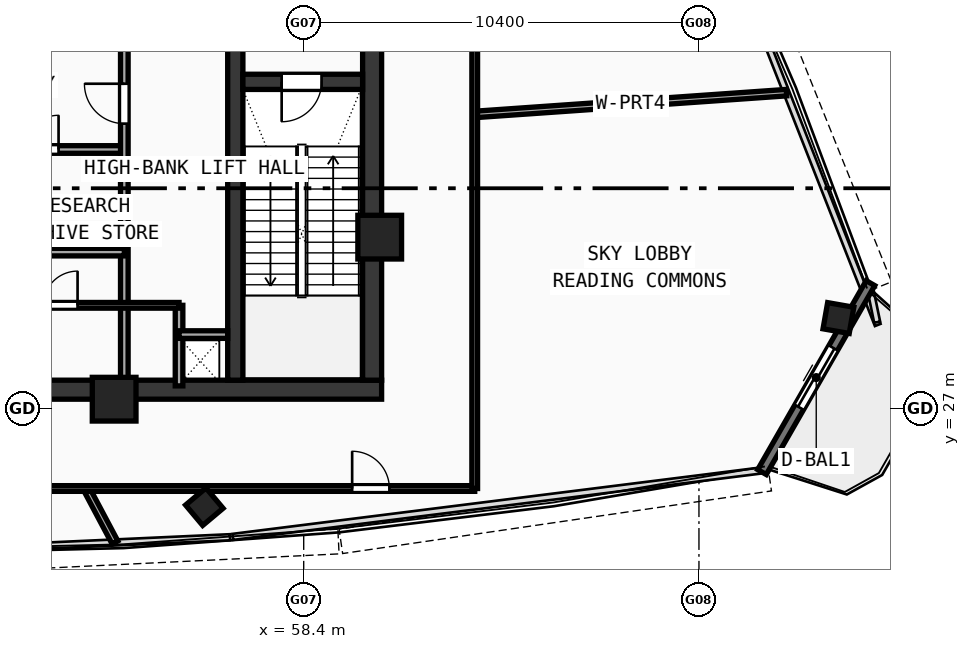
"""IFC4 building model, lengths in metres.
Left out: names, types, materials, properties, quantities, classifications, styles, units other than length and angle.
Written with IfcOpenShell. Run it as: python <this file> out.ifc"""

import sys

from ifc_helpers import new_model, si_unit, direction, frame, frame_2d, origin, origin_with_axes, origin_2d, place, context, subcontext, project, spatial, rectangle, hollow_rectangle, extrude, source, transform, mapped, element, fill, save


model = new_model("IFC4")
c1 = context("Model", 3, precision=1e-05, world=origin(), true_north=direction((0.0, 1.0)))
c2 = subcontext(c1, "Body", "Model", "MODEL_VIEW")
j1 = project(units=[si_unit("LENGTHUNIT", "METRE"), si_unit("PLANEANGLEUNIT", "RADIAN")], contexts=[c1])
p1 = place(None, origin())
s1 = spatial("IfcSite", under=j1, at=p1, CompositionType="ELEMENT")
p2 = place(p1, origin())
s2 = spatial("IfcBuilding", under=s1, at=p2, CompositionType="ELEMENT")
p3 = place(p2, frame((0.0, 0.0, 366.76)))
s3 = spatial("IfcBuildingStorey", under=s2, at=p3, CompositionType="ELEMENT", Elevation=366.76)
p4 = place(p3, frame((35.55, 27.5, 0.0), z_axis=(0.0, 0.0, 1.0), x_axis=(1.0, 0.0, 0.0)))
e1 = element("IfcWall", 1, at=p4, inside=s3, PredefinedType="SHEAR", context=c2, shape_type="SweptSolid", body=[
    extrude(rectangle(XDim=24.9, YDim=0.5, at=frame_2d((12.45, 0.0))), origin(), (0.0, 0.0, 1.0), 4.72),
])
p5 = place(p3, frame((60.2, 27.75, 0.0), z_axis=(0.0, 0.0, 1.0), x_axis=(0.0, 1.0, 0.0)))
e2 = element("IfcWall", 2, at=p5, inside=s3, PredefinedType="SHEAR", context=c2, shape_type="SweptSolid", body=[
    extrude(rectangle(XDim=12.2, YDim=0.5, at=frame_2d((6.1, 0.0))), origin(), (0.0, 0.0, 1.0), 4.72),
])
p6 = place(p3, frame((56.6, 27.75, 0.0), z_axis=(0.0, 0.0, 1.0), x_axis=(0.0, 1.0, 0.0)))
e3 = element("IfcWall", 3, at=p6, inside=s3, PredefinedType="SHEAR", context=c2, shape_type="SweptSolid", body=[
    extrude(rectangle(XDim=12.2, YDim=0.4, at=frame_2d((6.1, 0.0))), origin(), (0.0, 0.0, 1.0), 4.72),
])
p7 = place(p6, frame((10.0, 0.0, 0.0)))
e4 = element("IfcOpeningElement", 4, at=p7, cuts=e3, PredefinedType="OPENING", context=c2, shape_type="SweptSolid", body=[
    extrude(rectangle(XDim=1.1, YDim=2.1, at=frame_2d((0.55, 1.05))), frame((0.0, 0.21, 0.0), z_axis=(0.0, -1.0, 0.0), x_axis=(1.0, 0.0, 0.0)), (0.0, 0.0, 1.0), 0.42),
])
p8 = place(p3, frame((56.8, 35.6, 0.0), z_axis=(0.0, 0.0, 1.0), x_axis=(1.0, 0.0, 0.0)))
e5 = element("IfcWall", 5, at=p8, inside=s3, PredefinedType="SHEAR", context=c2, shape_type="SweptSolid", body=[
    extrude(rectangle(XDim=3.15, YDim=0.4, at=frame_2d((1.575, 0.0))), origin(), (0.0, 0.0, 1.0), 4.72),
])
p9 = place(p8, frame((1.02, 0.0, 0.0)))
e6 = element("IfcOpeningElement", 6, at=p9, cuts=e5, PredefinedType="OPENING", context=c2, shape_type="SweptSolid", body=[
    extrude(rectangle(XDim=1.05, YDim=2.1, at=frame_2d((0.525, 1.05))), frame((0.0, 0.21, 0.0), z_axis=(0.0, -1.0, 0.0), x_axis=(1.0, 0.0, 0.0)), (0.0, 0.0, 1.0), 0.42),
])
m1 = source(origin(), c2, "Body", "SweptSolid", [
    extrude(hollow_rectangle(XDim=1.15, YDim=1.15, WallThickness=0.048, at=origin_2d()), origin(), (0.0, 0.0, 1.0), 5.0),
])
for number, where, z_axis, x_axis in (
    (7, (53.412, 27.25, -0.28), (0.0, 0.0, 1.0), (1.0, 0.0, 0.0)),
    (8, (60.4, 31.513, -0.28), (0.0, 0.0, 1.0), (1.0, 0.0, 0.0)),
):
    element("IfcColumn", number, at=place(p3, frame(where, z_axis=z_axis, x_axis=x_axis)), inside=s3, PredefinedType="COLUMN", context=c2, shape_type="MappedRepresentation", body=[
        mapped(m1, transform((0.0, 0.0, 0.0), scale=1.0)),
    ])
m2 = source(origin(), c2, "Body", "SweptSolid", [
    extrude(hollow_rectangle(XDim=0.7, YDim=0.7, WallThickness=0.026, at=origin_2d()), origin(), (0.0, 0.0, 1.0), 5.0),
])
for number, where, z_axis, x_axis in (
    (9, (55.785, 24.422, -0.28), (0.0, 0.0, 1.0), (0.766, 0.643, 0.0)),
    (10, (72.47, 29.385, -0.28), (0.0, 0.0, 1.0), (0.174, 0.985, 0.0)),
):
    element("IfcColumn", number, at=place(p3, frame(where, z_axis=z_axis, x_axis=x_axis)), inside=s3, PredefinedType="COLUMN", context=c2, shape_type="MappedRepresentation", body=[
        mapped(m2, transform((0.0, 0.0, 0.0), scale=1.0)),
    ])
p10 = place(p3, frame((70.459, 25.333, 0.0), z_axis=(0.0, 0.0, 1.0), x_axis=(0.497922092791, 0.867221764897, 0.0)))
e11 = element("IfcWall", 11, at=p10, inside=s3, PredefinedType="STANDARD", context=c2, shape_type="SweptSolid", body=[
    extrude(rectangle(XDim=5.732, YDim=0.26, at=frame_2d((2.866, 0.0))), origin(), (0.0, 0.0, 1.0), 4.72),
])
p11 = place(p10, frame((1.966, 0.0, 0.0)))
e12 = element("IfcOpeningElement", 12, at=p11, cuts=e11, PredefinedType="OPENING", context=c2, shape_type="SweptSolid", body=[
    extrude(rectangle(XDim=1.8, YDim=2.15, at=frame_2d((0.9, 1.075))), frame((0.0, 0.14, 0.0), z_axis=(0.0, -1.0, 0.0), x_axis=(1.0, 0.0, 0.0)), (0.0, 0.0, 1.0), 0.28),
])
p12 = place(p3, frame((43.85, 33.82, 0.0), z_axis=(0.0, 0.0, 1.0), x_axis=(1.0, 0.0, 0.0)))
e13 = element("IfcWall", 13, at=p12, inside=s3, PredefinedType="SOLIDWALL", context=c2, shape_type="SweptSolid", body=[
    extrude(rectangle(XDim=9.83, YDim=0.2, at=frame_2d((4.915, 0.0))), origin(), (0.0, 0.0, 1.0), 4.72),
])
p13 = place(p12, frame((1.2, 0.0, 0.0)))
e14 = element("IfcOpeningElement", 14, at=p13, cuts=e13, PredefinedType="OPENING", context=c2, shape_type="SweptSolid", body=[
    extrude(rectangle(XDim=0.9, YDim=2.1, at=frame_2d((0.45, 1.05))), frame((0.0, 0.11, 0.0), z_axis=(0.0, -1.0, 0.0), x_axis=(1.0, 0.0, 0.0)), (0.0, 0.0, 1.0), 0.22),
])
p14 = place(p12, frame((7.2, 0.0, 0.0)))
e15 = element("IfcOpeningElement", 15, at=p14, cuts=e13, PredefinedType="OPENING", context=c2, shape_type="SweptSolid", body=[
    extrude(rectangle(XDim=0.9, YDim=2.1, at=frame_2d((0.45, 1.05))), frame((0.0, 0.11, 0.0), z_axis=(0.0, -1.0, 0.0), x_axis=(1.0, 0.0, 0.0)), (0.0, 0.0, 1.0), 0.22),
])
p15 = place(p3, frame((53.68, 27.6, 0.0), z_axis=(0.0, 0.0, 1.0), x_axis=(0.0, 1.0, 0.0)))
e16 = element("IfcWall", 16, at=p15, inside=s3, PredefinedType="SOLIDWALL", context=c2, shape_type="SweptSolid", body=[
    extrude(rectangle(XDim=9.05, YDim=0.2, at=frame_2d((4.525, 0.0))), origin(), (0.0, 0.0, 1.0), 4.72),
])
p16 = place(p15, frame((6.9, 0.0, 0.0)))
e17 = element("IfcOpeningElement", 17, at=p16, cuts=e16, PredefinedType="OPENING", context=c2, shape_type="SweptSolid", body=[
    extrude(rectangle(XDim=1.05, YDim=2.1, at=frame_2d((0.525, 1.05))), frame((0.0, 0.11, 0.0), z_axis=(0.0, -1.0, 0.0), x_axis=(1.0, 0.0, 0.0)), (0.0, 0.0, 1.0), 0.22),
])
p17 = place(p3, frame((43.85, 31.12, 0.0), z_axis=(0.0, 0.0, 1.0), x_axis=(1.0, 0.0, 0.0)))
e18 = element("IfcWall", 18, at=p17, inside=s3, PredefinedType="SOLIDWALL", context=c2, shape_type="SweptSolid", body=[
    extrude(rectangle(XDim=9.83, YDim=0.2, at=frame_2d((4.915, 0.0))), origin(), (0.0, 0.0, 1.0), 4.72),
])
p18 = place(p3, frame((55.12, 27.6, 0.0), z_axis=(0.0, 0.0, 1.0), x_axis=(0.0, 1.0, 0.0)))
e19 = element("IfcWall", 19, at=p18, inside=s3, PredefinedType="SOLIDWALL", context=c2, shape_type="SweptSolid", body=[
    extrude(rectangle(XDim=2.12, YDim=0.2, at=frame_2d((1.06, 0.0))), origin(), (0.0, 0.0, 1.0), 4.72),
])
p19 = place(p3, frame((55.12, 28.95, 0.0), z_axis=(0.0, 0.0, 1.0), x_axis=(1.0, 0.0, 0.0)))
e20 = element("IfcWall", 20, at=p19, inside=s3, PredefinedType="SOLIDWALL", context=c2, shape_type="SweptSolid", body=[
    extrude(rectangle(XDim=1.28, YDim=0.2, at=frame_2d((0.64, 0.0))), origin(), (0.0, 0.0, 1.0), 4.72),
])
p20 = place(p3, frame((51.05, 29.72, 0.0), z_axis=(0.0, 0.0, 1.0), x_axis=(1.0, 0.0, 0.0)))
e21 = element("IfcWall", 21, at=p20, inside=s3, PredefinedType="PARTITIONING", context=c2, shape_type="SweptSolid", body=[
    extrude(rectangle(XDim=4.07, YDim=0.15, at=frame_2d((2.035, 0.0))), origin(), (0.0, 0.0, 1.0), 4.72),
])
p21 = place(p20, frame((0.5, 0.0, 0.0)))
e22 = element("IfcOpeningElement", 22, at=p21, cuts=e21, PredefinedType="OPENING", context=c2, shape_type="SweptSolid", body=[
    extrude(rectangle(XDim=0.9, YDim=2.1, at=frame_2d((0.45, 1.05))), frame((0.0, 0.085, 0.0), z_axis=(0.0, -1.0, 0.0), x_axis=(1.0, 0.0, 0.0)), (0.0, 0.0, 1.0), 0.17),
])
p22 = place(p3, frame((62.9, 34.742, 0.0), z_axis=(0.0, 0.0, 1.0), x_axis=(0.99756353515, 0.069763839764, 0.0)))
e23 = element("IfcWall", 23, at=p22, inside=s3, PredefinedType="PARTITIONING", context=c2, shape_type="SweptSolid", body=[
    extrude(rectangle(XDim=8.224, YDim=0.17, at=frame_2d((4.112, 0.0))), origin(), (0.0, 0.0, 1.0), 4.12),
])
p23 = place(p3, frame((52.679, 24.9, 0.0), z_axis=(0.0, 0.0, 1.0), x_axis=(0.469477034004, -0.882944683739, 0.0)))
e24 = element("IfcWall", 24, at=p23, inside=s3, PredefinedType="PARTITIONING", context=c2, shape_type="SweptSolid", body=[
    extrude(rectangle(XDim=1.608, YDim=0.17, at=frame_2d((0.804, 0.0))), origin(), (0.0, 0.0, 1.0), 4.12),
])
p24 = place(p3, frame((33.1, 24.9, 0.0), z_axis=(0.0, 0.0, 1.0), x_axis=(1.0, 0.0, 0.0)))
e25 = element("IfcWall", 25, at=p24, inside=s3, PredefinedType="PARTITIONING", context=c2, shape_type="SweptSolid", body=[
    extrude(rectangle(XDim=29.8, YDim=0.15, at=frame_2d((14.9, 0.0))), origin(), (0.0, 0.0, 1.0), 4.12),
])
p25 = place(p24, frame((14.425, 0.0, 0.0)))
e26 = element("IfcOpeningElement", 26, at=p25, cuts=e25, PredefinedType="OPENING", context=c2, shape_type="SweptSolid", body=[
    extrude(rectangle(XDim=0.98, YDim=2.12, at=frame_2d((0.49, 1.06))), frame((0.0, 0.085, 0.0), z_axis=(0.0, -1.0, 0.0), x_axis=(1.0, 0.0, 0.0)), (0.0, 0.0, 1.0), 0.17),
])
p26 = place(p24, frame((26.575, 0.0, 0.0)))
e27 = element("IfcOpeningElement", 27, at=p26, cuts=e25, PredefinedType="OPENING", context=c2, shape_type="SweptSolid", body=[
    extrude(rectangle(XDim=0.98, YDim=2.12, at=frame_2d((0.49, 1.06))), frame((0.0, 0.085, 0.0), z_axis=(0.0, -1.0, 0.0), x_axis=(1.0, 0.0, 0.0)), (0.0, 0.0, 1.0), 0.17),
])
p27 = place(p3, frame((62.9, 24.9, 0.0), z_axis=(0.0, 0.0, 1.0), x_axis=(0.0, 1.0, 0.0)))
e28 = element("IfcWall", 28, at=p27, inside=s3, PredefinedType="PARTITIONING", context=c2, shape_type="SweptSolid", body=[
    extrude(rectangle(XDim=18.65, YDim=0.15, at=frame_2d((9.325, 0.0))), origin(), (0.0, 0.0, 1.0), 4.12),
])
m3 = source(origin(), c2, "Body", "SweptSolid", [
    extrude(rectangle(XDim=1.8, YDim=2.15, at=frame_2d((0.9, 1.075))), frame((0.0, 0.025, 0.0), z_axis=(0.0, -1.0, 0.0), x_axis=(1.0, 0.0, 0.0)), (0.0, 0.0, 1.0), 0.05),
])
p28 = place(p11, origin_with_axes())
e29 = element("IfcDoor", 29, at=p28, inside=s3, OperationType="DOUBLE_DOOR_SLIDING", PredefinedType="DOOR", context=c2, shape_type="MappedRepresentation", body=[
    mapped(m3, transform((0.0, 0.0, 0.0), scale=1.0)),
])
fill(e12, e29)
m4 = source(origin(), c2, "Body", "SweptSolid", [
    extrude(rectangle(XDim=1.05, YDim=2.1, at=frame_2d((0.525, 1.05))), frame((0.0, 0.025, 0.0), z_axis=(0.0, -1.0, 0.0), x_axis=(1.0, 0.0, 0.0)), (0.0, 0.0, 1.0), 0.05),
])
p29 = place(p9, frame((1.05, 0.0, 0.0), z_axis=(0.0, 0.0, 1.0), x_axis=(-1.0, 0.0, 0.0)))
e30 = element("IfcDoor", 30, at=p29, inside=s3, OperationType="SINGLE_SWING_RIGHT", PredefinedType="DOOR", context=c2, shape_type="MappedRepresentation", body=[
    mapped(m4, transform((0.0, 0.0, 0.0), scale=1.0)),
])
fill(e6, e30)
m5 = source(origin(), c2, "Body", "SweptSolid", [
    extrude(rectangle(XDim=0.9, YDim=2.1, at=frame_2d((0.45, 1.05))), frame((0.0, 0.025, 0.0), z_axis=(0.0, -1.0, 0.0), x_axis=(1.0, 0.0, 0.0)), (0.0, 0.0, 1.0), 0.05),
])
p30 = place(p14, origin_with_axes())
e31 = element("IfcDoor", 31, at=p30, inside=s3, OperationType="SINGLE_SWING_RIGHT", PredefinedType="DOOR", context=c2, shape_type="MappedRepresentation", body=[
    mapped(m5, transform((0.0, 0.0, 0.0), scale=1.0)),
])
fill(e15, e31)
p31 = place(p16, origin_with_axes())
e32 = element("IfcDoor", 32, at=p31, inside=s3, OperationType="SINGLE_SWING_RIGHT", PredefinedType="DOOR", context=c2, shape_type="MappedRepresentation", body=[
    mapped(m4, transform((0.0, 0.0, 0.0), scale=1.0)),
])
fill(e17, e32)
p32 = place(p21, origin_with_axes())
e33 = element("IfcDoor", 33, at=p32, inside=s3, OperationType="SINGLE_SWING_RIGHT", PredefinedType="DOOR", context=c2, shape_type="MappedRepresentation", body=[
    mapped(m5, transform((0.0, 0.0, 0.0), scale=1.0)),
])
fill(e22, e33)
m6 = source(origin(), c2, "Body", "SweptSolid", [
    extrude(rectangle(XDim=0.98, YDim=2.12, at=frame_2d((0.49, 1.06))), frame((0.0, 0.025, 0.0), z_axis=(0.0, -1.0, 0.0), x_axis=(1.0, 0.0, 0.0)), (0.0, 0.0, 1.0), 0.05),
])
p33 = place(p26, origin_with_axes())
e34 = element("IfcDoor", 34, at=p33, inside=s3, OperationType="SINGLE_SWING_LEFT", PredefinedType="DOOR", context=c2, shape_type="MappedRepresentation", body=[
    mapped(m6, transform((0.0, 0.0, 0.0), scale=1.0)),
])
fill(e27, e34)
save(model, sys.argv[1])
